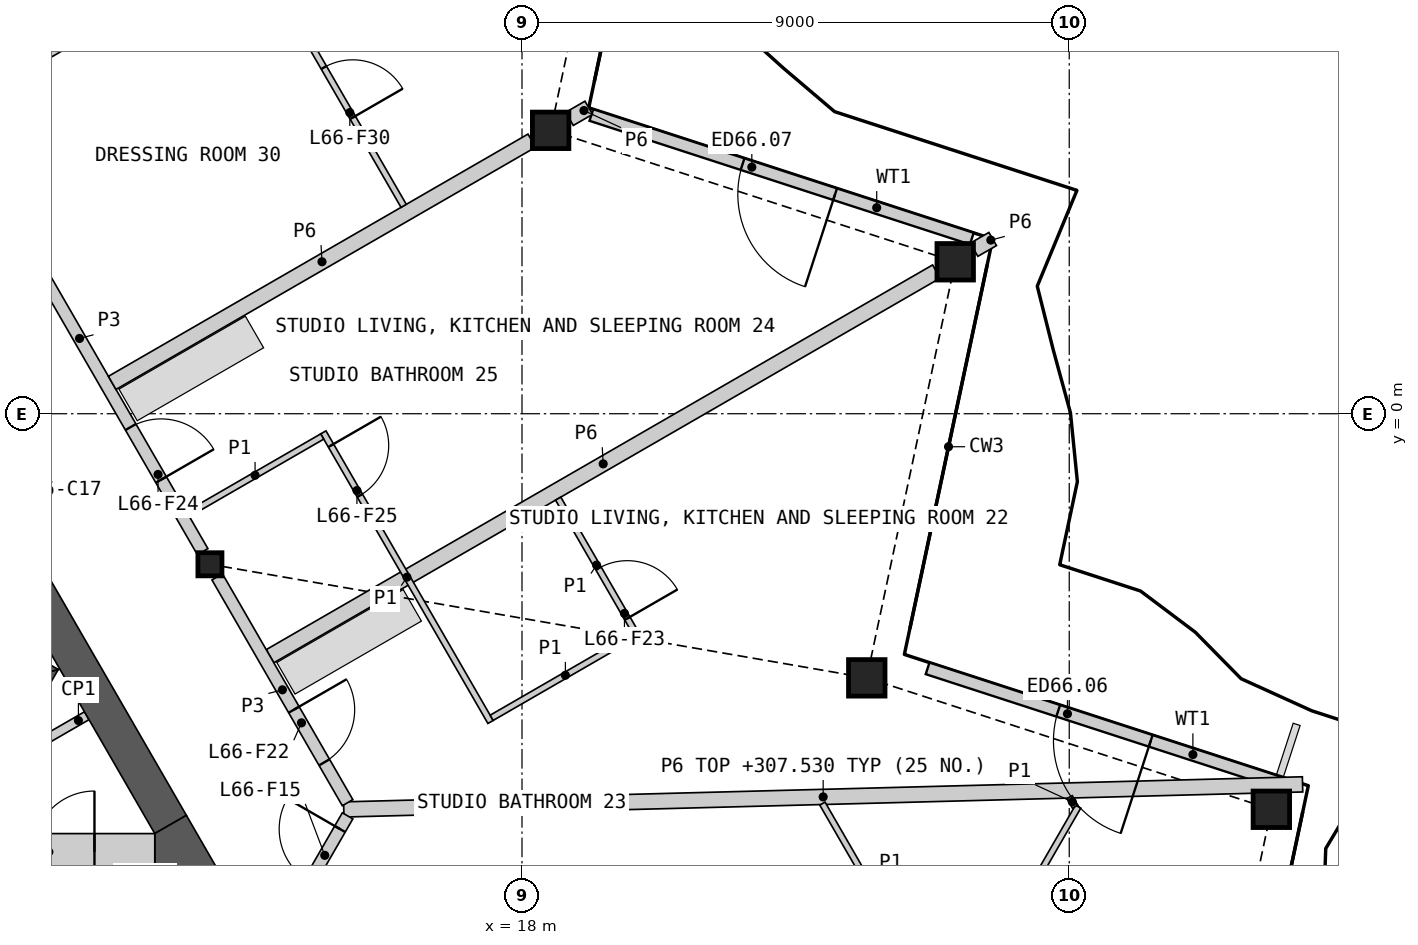
"""IFC4 building model, lengths in metres.
Left out: names, types, materials, properties, quantities, classifications, styles, units other than length and angle.
Written with IfcOpenShell. Run it as: python <this file> out.ifc"""

import sys

from ifc_helpers import new_model, si_unit, direction, frame, frame_2d, origin, origin_2d, place, context, subcontext, project, spatial, polyline, rectangle, hollow_rectangle, i_section, outline, extrude, element, fill, save


model = new_model("IFC4")
c1 = context("Model", 3, precision=1e-05, world=origin(), true_north=direction((0.0, 1.0)))
c2 = subcontext(c1, "Body", "Model", "MODEL_VIEW")
j1 = project(units=[si_unit("LENGTHUNIT", "METRE"), si_unit("PLANEANGLEUNIT", "RADIAN")], contexts=[c1])
p1 = place(None, origin())
s1 = spatial("IfcSite", under=j1, at=p1, CompositionType="ELEMENT")
p2 = place(p1, origin())
s2 = spatial("IfcBuilding", under=s1, at=p2, CompositionType="ELEMENT")
p3 = place(p2, frame((0.0, 0.0, 305.2)))
s3 = spatial("IfcBuildingStorey", under=s2, at=p3, CompositionType="ELEMENT", Elevation=305.2)
for number, where, z_axis, x_axis in (
    (1, (30.324, -6.506, 0.0), (0.0, 0.0, 1.0), (1.0, 0.0, 0.0)),
    (2, (23.67, -4.344, 0.0), (0.0, 0.0, 1.0), (1.0, 0.0, 0.0)),
    (3, (25.125, 2.499, 0.0), (0.0, 0.0, 1.0), (1.0, 0.0, 0.0)),
    (4, (18.471, 4.661, 0.0), (0.0, 0.0, 1.0), (1.0, 0.0, 0.0)),
):
    element("IfcColumn", number, at=place(p3, frame(where, z_axis=z_axis, x_axis=x_axis)), inside=s3, PredefinedType="COLUMN", context=c2, shape_type="SweptSolid", body=[
        extrude(hollow_rectangle(XDim=0.6, YDim=0.6, WallThickness=0.04, at=origin_2d()), origin(), (0.0, 0.0, 1.0), 3.4),
    ])
p4 = place(p3, frame((12.868, -2.476, 0.0), z_axis=(0.0, 0.0, 1.0), x_axis=(1.0, 0.0, 0.0)))
e5 = element("IfcColumn", 5, at=p4, inside=s3, PredefinedType="COLUMN", context=c2, shape_type="SweptSolid", body=[
    extrude(i_section(OverallWidth=0.396, OverallDepth=0.381, WebThickness=0.019, FlangeThickness=0.03, at=origin_2d()), origin(), (0.0, 0.0, 1.0), 3.4),
])
p5 = place(p3, frame((30.488, -6.078, 0.0), z_axis=(0.0, 0.0, 1.0), x_axis=(-0.951062515241, 0.308998530908, 0.0)))
e6 = element("IfcWall", 6, at=p5, inside=s3, PredefinedType="SOLIDWALL", context=c2, shape_type="SweptSolid", body=[
    extrude(rectangle(XDim=6.117, YDim=0.2, at=frame_2d((3.059, 0.0))), origin(), (0.0, 0.0, 1.0), 2.488),
])
p6 = place(p5, frame((2.259, 0.0, 0.0)))
e7 = element("IfcOpeningElement", 7, at=p6, cuts=e6, PredefinedType="OPENING", context=c2, shape_type="SweptSolid", body=[
    extrude(rectangle(XDim=1.6, YDim=2.25, at=frame_2d((0.8, 1.125))), frame((0.0, 0.11, 0.0), z_axis=(0.0, -1.0, 0.0), x_axis=(1.0, 0.0, 0.0)), (0.0, 0.0, 1.0), 0.22),
])
p7 = place(p3, frame((25.398, 2.88, 0.0), z_axis=(0.0, 0.0, 1.0), x_axis=(-0.95105697409, 0.309015585424, 0.0)))
e8 = element("IfcWall", 8, at=p7, inside=s3, PredefinedType="SOLIDWALL", context=c2, shape_type="SweptSolid", body=[
    extrude(rectangle(XDim=6.579, YDim=0.2, at=frame_2d((3.29, 0.0))), origin(), (0.0, 0.0, 1.0), 2.488),
])
p8 = place(p7, frame((2.364, 0.0, 0.0)))
e9 = element("IfcOpeningElement", 9, at=p8, cuts=e8, PredefinedType="OPENING", context=c2, shape_type="SweptSolid", body=[
    extrude(rectangle(XDim=1.6, YDim=2.25, at=frame_2d((0.8, 1.125))), frame((0.0, 0.11, 0.0), z_axis=(0.0, -1.0, 0.0), x_axis=(1.0, 0.0, 0.0)), (0.0, 0.0, 1.0), 0.22),
])
p9 = place(p3, origin())
e10 = element("IfcWall", 10, at=p9, inside=s3, PredefinedType="SHEAR", context=c2, shape_type="SweptSolid", body=[
    extrude(outline(polyline([(8.83, -6.881), (10.374, -4.206), (10.032, -4.298), (8.738, -6.539), (8.83, -6.881)])), origin(), (0.0, 0.0, 1.0), 3.1),
])
p10 = place(p3, origin())
e11 = element("IfcWall", 11, at=p10, inside=s3, PredefinedType="SHEAR", context=c2, shape_type="SweptSolid", body=[
    extrude(outline(polyline([(10.032, -4.298), (10.374, -4.206), (5.307, -1.281), (5.182, -1.498), (10.032, -4.298)])), origin(), (0.0, 0.0, 1.0), 3.1),
])
p11 = place(p3, frame((10.842, -4.967, 0.0), z_axis=(0.0, 0.0, 1.0), x_axis=(-0.866098216386, -0.499873863663, 0.0)))
e12 = element("IfcWall", 12, at=p11, inside=s3, PredefinedType="PARTITIONING", context=c2, shape_type="SweptSolid", body=[
    extrude(rectangle(XDim=1.582, YDim=0.15, at=frame_2d((0.791, 0.0))), origin(), (0.0, 0.0, 1.0), 3.1),
])
p12 = place(p3, frame((12.221, -6.756, 0.0), z_axis=(0.0, 0.0, 1.0), x_axis=(-0.500020646047, 0.866013483456, 0.0)))
e13 = element("IfcWall", 13, at=p12, inside=s3, PredefinedType="SHEAR", context=c2, shape_type="SweptSolid", body=[
    extrude(rectangle(XDim=4.559, YDim=0.6, at=frame_2d((2.28, 0.0))), origin(), (0.0, 0.0, 1.0), 3.1),
])
p13 = place(p3, origin())
e14 = element("IfcWall", 14, at=p13, inside=s3, PredefinedType="SHEAR", context=c2, shape_type="SweptSolid", body=[
    extrude(outline(polyline([(11.961, -7.506), (11.961, -6.906), (12.48, -6.606), (13.0, -7.506), (11.961, -7.506)])), origin(), (0.0, 0.0, 1.0), 3.1),
])
p14 = place(p3, frame((9.369, -7.206, 0.0), z_axis=(0.0, 0.0, 1.0), x_axis=(1.0, 0.0, 0.0)))
e15 = element("IfcWall", 15, at=p14, inside=s3, PredefinedType="SHEAR", context=c2, shape_type="SweptSolid", body=[
    extrude(rectangle(XDim=2.592, YDim=0.6, at=frame_2d((1.296, 0.0))), origin(), (0.0, 0.0, 1.0), 3.1),
])
p15 = place(p14, frame((0.6, 0.0, 0.0)))
e16 = element("IfcOpeningElement", 16, at=p15, cuts=e15, PredefinedType="OPENING", context=c2, shape_type="SweptSolid", body=[
    extrude(rectangle(XDim=1.0, YDim=2.1, at=frame_2d((0.5, 1.05))), frame((0.0, 0.31, 0.0), z_axis=(0.0, -1.0, 0.0), x_axis=(1.0, 0.0, 0.0)), (0.0, 0.0, 1.0), 0.62),
])
p16 = place(p3, frame((15.069, -6.509, 0.0), z_axis=(0.0, 0.0, 1.0), x_axis=(0.999657828615, 0.026157708023, 0.0)))
e17 = element("IfcWall", 17, at=p16, inside=s3, PredefinedType="PARTITIONING", context=c2, shape_type="SweptSolid", body=[
    extrude(rectangle(XDim=15.773, YDim=0.25, at=frame_2d((7.887, 0.0))), origin(), (0.0, 0.0, 1.0), 2.33),
])
p17 = place(p3, frame((13.856, -3.988, 0.0), z_axis=(0.0, 0.0, 1.0), x_axis=(0.866021406514, 0.500006923412, 0.0)))
e18 = element("IfcWall", 18, at=p17, inside=s3, PredefinedType="PARTITIONING", context=c2, shape_type="SweptSolid", body=[
    extrude(rectangle(XDim=12.654, YDim=0.25, at=frame_2d((6.327, 0.0))), origin(), (0.0, 0.0, 1.0), 2.33),
])
p18 = place(p3, frame((8.698, 4.745, 0.0), z_axis=(0.0, 0.0, 1.0), x_axis=(0.499984266882, -0.866034487114, 0.0)))
e19 = element("IfcWall", 19, at=p18, inside=s3, PredefinedType="PARTITIONING", context=c2, shape_type="SweptSolid", body=[
    extrude(rectangle(XDim=8.099, YDim=0.2, at=frame_2d((4.049, 0.0))), origin(), (0.0, 0.0, 1.0), 3.1),
])
p19 = place(p18, frame((5.732, 0.0, 0.0)))
e20 = element("IfcOpeningElement", 20, at=p19, cuts=e19, PredefinedType="OPENING", context=c2, shape_type="SweptSolid", body=[
    extrude(rectangle(XDim=1.0, YDim=2.1, at=frame_2d((0.5, 1.05))), frame((0.0, 0.11, 0.0), z_axis=(0.0, -1.0, 0.0), x_axis=(1.0, 0.0, 0.0)), (0.0, 0.0, 1.0), 0.22),
])
p20 = place(p3, frame((11.26, 0.507, 0.0), z_axis=(0.0, 0.0, 1.0), x_axis=(0.86602842894, 0.499994760241, 0.0)))
e21 = element("IfcWall", 21, at=p20, inside=s3, PredefinedType="PARTITIONING", context=c2, shape_type="SweptSolid", body=[
    extrude(rectangle(XDim=7.968, YDim=0.25, at=frame_2d((3.984, 0.0))), origin(), (0.0, 0.0, 1.0), 2.33),
])
p21 = place(p3, frame((12.988, -2.684, 0.0), z_axis=(0.0, 0.0, 1.0), x_axis=(0.500003406062, -0.866023437285, 0.0)))
e22 = element("IfcWall", 22, at=p21, inside=s3, PredefinedType="PARTITIONING", context=c2, shape_type="SweptSolid", body=[
    extrude(rectangle(XDim=4.288, YDim=0.2, at=frame_2d((2.144, 0.0))), origin(), (0.0, 0.0, 1.0), 3.1),
])
p22 = place(p21, frame((2.521, 0.0, 0.0)))
e23 = element("IfcOpeningElement", 23, at=p22, cuts=e22, PredefinedType="OPENING", context=c2, shape_type="SweptSolid", body=[
    extrude(rectangle(XDim=1.0, YDim=2.1, at=frame_2d((0.5, 1.05))), frame((0.0, 0.11, 0.0), z_axis=(0.0, -1.0, 0.0), x_axis=(1.0, 0.0, 0.0)), (0.0, 0.0, 1.0), 0.22),
])
p23 = place(p3, frame((13.293, -9.797, 0.0), z_axis=(0.0, 0.0, 1.0), x_axis=(0.499967746641, 0.866044024469, 0.0)))
e24 = element("IfcWall", 24, at=p23, inside=s3, PredefinedType="PARTITIONING", context=c2, shape_type="SweptSolid", body=[
    extrude(rectangle(XDim=3.676, YDim=0.2, at=frame_2d((1.838, 0.0))), origin(), (0.0, 0.0, 1.0), 3.1),
])
p24 = place(p23, frame((2.426, 0.0, 0.0)))
e25 = element("IfcOpeningElement", 25, at=p24, cuts=e24, PredefinedType="OPENING", context=c2, shape_type="SweptSolid", body=[
    extrude(rectangle(XDim=1.0, YDim=2.1, at=frame_2d((0.5, 1.05))), frame((0.0, 0.11, 0.0), z_axis=(0.0, -1.0, 0.0), x_axis=(1.0, 0.0, 0.0)), (0.0, 0.0, 1.0), 0.22),
])
p25 = place(p3, frame((18.781, 4.849, 0.0), z_axis=(0.0, 0.0, 1.0), x_axis=(0.86609656662, 0.499876722092, 0.0)))
e26 = element("IfcWall", 26, at=p25, inside=s3, PredefinedType="PARTITIONING", context=c2, shape_type="SweptSolid", body=[
    extrude(rectangle(XDim=0.365, YDim=0.25, at=frame_2d((0.183, 0.0))), origin(), (0.0, 0.0, 1.0), 2.33),
])
p26 = place(p3, frame((25.435, 2.697, 0.0), z_axis=(0.0, 0.0, 1.0), x_axis=(0.865851769275, 0.500300623268, 0.0)))
e27 = element("IfcWall", 27, at=p26, inside=s3, PredefinedType="PARTITIONING", context=c2, shape_type="SweptSolid", body=[
    extrude(rectangle(XDim=0.353, YDim=0.25, at=frame_2d((0.177, 0.0))), origin(), (0.0, 0.0, 1.0), 2.33),
])
p27 = place(p3, frame((8.786, 5.073, 0.0), z_axis=(0.0, 0.0, 1.0), x_axis=(0.86602139559, 0.500006942333, 0.0)))
e28 = element("IfcWall", 28, at=p27, inside=s3, PredefinedType="PARTITIONING", context=c2, shape_type="SweptSolid", body=[
    extrude(rectangle(XDim=12.505, YDim=0.1, at=frame_2d((6.252, 0.0))), origin(), (0.0, 0.0, 1.0), 2.33),
])
p28 = place(p27, frame((5.677, 0.0, 0.0)))
e29 = element("IfcOpeningElement", 29, at=p28, cuts=e28, PredefinedType="OPENING", context=c2, shape_type="SweptSolid", body=[
    extrude(rectangle(XDim=0.95, YDim=2.1, at=frame_2d((0.475, 1.05))), frame((0.0, 0.06, 0.0), z_axis=(0.0, -1.0, 0.0), x_axis=(1.0, 0.0, 0.0)), (0.0, 0.0, 1.0), 0.12),
])
p29 = place(p3, frame((23.183, -13.327, 0.0), z_axis=(0.0, 0.0, 1.0), x_axis=(0.499991741039, 0.866030172045, 0.0)))
e30 = element("IfcWall", 30, at=p29, inside=s3, PredefinedType="PARTITIONING", context=c2, shape_type="SweptSolid", body=[
    extrude(rectangle(XDim=7.927, YDim=0.1, at=frame_2d((3.963, 0.0))), origin(), (0.0, 0.0, 1.0), 2.33),
])
p30 = place(p29, frame((1.97, 0.0, 0.0)))
e31 = element("IfcOpeningElement", 31, at=p30, cuts=e30, PredefinedType="OPENING", context=c2, shape_type="SweptSolid", body=[
    extrude(rectangle(XDim=0.95, YDim=2.1, at=frame_2d((0.475, 1.05))), frame((0.0, 0.06, 0.0), z_axis=(0.0, -1.0, 0.0), x_axis=(1.0, 0.0, 0.0)), (0.0, 0.0, 1.0), 0.12),
])
p31 = place(p3, frame((14.733, -0.307, 0.0), z_axis=(0.0, 0.0, 1.0), x_axis=(0.499996545922, -0.866027397988, 0.0)))
e32 = element("IfcWall", 32, at=p31, inside=s3, PredefinedType="PARTITIONING", context=c2, shape_type="SweptSolid", body=[
    extrude(rectangle(XDim=5.5, YDim=0.1, at=frame_2d((2.75, 0.0))), origin(), (0.0, 0.0, 1.0), 2.33),
])
p32 = place(p31, frame((0.25, 0.0, 0.0)))
e33 = element("IfcOpeningElement", 33, at=p32, cuts=e32, PredefinedType="OPENING", context=c2, shape_type="SweptSolid", body=[
    extrude(rectangle(XDim=0.95, YDim=2.1, at=frame_2d((0.475, 1.05))), frame((0.0, 0.06, 0.0), z_axis=(0.0, -1.0, 0.0), x_axis=(1.0, 0.0, 0.0)), (0.0, 0.0, 1.0), 0.12),
])
p33 = place(p3, frame((13.546, 7.763, 0.0), z_axis=(0.0, 0.0, 1.0), x_axis=(0.500028620461, -0.866008879123, 0.0)))
e34 = element("IfcWall", 34, at=p33, inside=s3, PredefinedType="PARTITIONING", context=c2, shape_type="SweptSolid", body=[
    extrude(rectangle(XDim=5.016, YDim=0.1, at=frame_2d((2.508, 0.0))), origin(), (0.0, 0.0, 1.0), 2.33),
])
p34 = place(p33, frame((2.39, 0.0, 0.0)))
e35 = element("IfcOpeningElement", 35, at=p34, cuts=e34, PredefinedType="OPENING", context=c2, shape_type="SweptSolid", body=[
    extrude(rectangle(XDim=0.95, YDim=2.1, at=frame_2d((0.475, 1.05))), frame((0.0, 0.06, 0.0), z_axis=(0.0, -1.0, 0.0), x_axis=(1.0, 0.0, 0.0)), (0.0, 0.0, 1.0), 0.12),
])
p35 = place(p3, frame((22.941, -6.413, 0.0), z_axis=(0.0, 0.0, 1.0), x_axis=(0.500013199183, -0.866017783098, 0.0)))
e36 = element("IfcWall", 36, at=p35, inside=s3, PredefinedType="PARTITIONING", context=c2, shape_type="SweptSolid", body=[
    extrude(rectangle(XDim=3.077, YDim=0.1, at=frame_2d((1.539, 0.0))), origin(), (0.0, 0.0, 1.0), 2.33),
])
p36 = place(p3, frame((17.501, -5.001, 0.0), z_axis=(0.0, 0.0, 1.0), x_axis=(0.866034573852, 0.49998411664, 0.0)))
e37 = element("IfcWall", 37, at=p36, inside=s3, PredefinedType="PARTITIONING", context=c2, shape_type="SweptSolid", body=[
    extrude(rectangle(XDim=2.8, YDim=0.1, at=frame_2d((1.4, 0.0))), origin(), (0.0, 0.0, 1.0), 2.33),
])
p37 = place(p3, frame((18.595, -1.396, 0.0), z_axis=(0.0, 0.0, 1.0), x_axis=(0.499976333282, -0.866039067339, 0.0)))
e38 = element("IfcWall", 38, at=p37, inside=s3, PredefinedType="PARTITIONING", context=c2, shape_type="SweptSolid", body=[
    extrude(rectangle(XDim=2.525, YDim=0.1, at=frame_2d((1.262, 0.0))), origin(), (0.0, 0.0, 1.0), 2.33),
])
p38 = place(p37, frame((1.325, 0.0, 0.0)))
e39 = element("IfcOpeningElement", 39, at=p38, cuts=e38, PredefinedType="OPENING", context=c2, shape_type="SweptSolid", body=[
    extrude(rectangle(XDim=0.95, YDim=2.1, at=frame_2d((0.475, 1.05))), frame((0.0, 0.06, 0.0), z_axis=(0.0, -1.0, 0.0), x_axis=(1.0, 0.0, 0.0)), (0.0, 0.0, 1.0), 0.12),
])
p39 = place(p3, frame((12.506, -1.65, 0.0), z_axis=(0.0, 0.0, 1.0), x_axis=(0.866030925526, 0.499990435942, 0.0)))
e40 = element("IfcWall", 40, at=p39, inside=s3, PredefinedType="PARTITIONING", context=c2, shape_type="SweptSolid", body=[
    extrude(rectangle(XDim=2.55, YDim=0.1, at=frame_2d((1.275, 0.0))), origin(), (0.0, 0.0, 1.0), 2.33),
])
p40 = place(p3, frame((27.006, -6.306, 0.0), z_axis=(0.0, 0.0, 1.0), x_axis=(0.500074377092, -0.865982457891, 0.0)))
e41 = element("IfcWall", 41, at=p40, inside=s3, PredefinedType="PARTITIONING", context=c2, shape_type="SweptSolid", body=[
    extrude(rectangle(XDim=0.18, YDim=0.1, at=frame_2d((0.09, 0.0))), origin(), (0.0, 0.0, 1.0), 2.33),
])
p41 = place(p6, origin())
e42 = element("IfcDoor", 42, at=p41, inside=s3, OperationType="DOUBLE_DOOR_SINGLE_SWING", PredefinedType="DOOR", context=c2, shape_type="SweptSolid", body=[
    extrude(rectangle(XDim=1.6, YDim=2.25, at=frame_2d((0.8, 1.125))), frame((0.0, 0.025, 0.0), z_axis=(0.0, -1.0, 0.0), x_axis=(1.0, 0.0, 0.0)), (0.0, 0.0, 1.0), 0.05),
])
fill(e7, e42)
p42 = place(p8, origin())
e43 = element("IfcDoor", 43, at=p42, inside=s3, OperationType="DOUBLE_DOOR_SINGLE_SWING", PredefinedType="DOOR", context=c2, shape_type="SweptSolid", body=[
    extrude(rectangle(XDim=1.6, YDim=2.25, at=frame_2d((0.8, 1.125))), frame((0.0, 0.025, 0.0), z_axis=(0.0, -1.0, 0.0), x_axis=(1.0, 0.0, 0.0)), (0.0, 0.0, 1.0), 0.05),
])
fill(e9, e43)
p43 = place(p15, origin())
e44 = element("IfcDoor", 44, at=p43, inside=s3, OperationType="SINGLE_SWING_RIGHT", PredefinedType="DOOR", context=c2, shape_type="SweptSolid", body=[
    extrude(rectangle(XDim=1.0, YDim=2.1, at=frame_2d((0.5, 1.05))), frame((0.0, 0.055, 0.0), z_axis=(0.0, -1.0, 0.0), x_axis=(1.0, 0.0, 0.0)), (0.0, 0.0, 1.0), 0.05),
])
fill(e16, e44)
p44 = place(p24, origin())
e45 = element("IfcDoor", 45, at=p44, inside=s3, OperationType="SINGLE_SWING_RIGHT", PredefinedType="DOOR", context=c2, shape_type="SweptSolid", body=[
    extrude(rectangle(XDim=1.0, YDim=2.1, at=frame_2d((0.5, 1.05))), frame((0.0, 0.025, 0.0), z_axis=(0.0, -1.0, 0.0), x_axis=(1.0, 0.0, 0.0)), (0.0, 0.0, 1.0), 0.05),
])
fill(e25, e45)
p45 = place(p22, origin())
e46 = element("IfcDoor", 46, at=p45, inside=s3, OperationType="SINGLE_SWING_LEFT", PredefinedType="DOOR", context=c2, shape_type="SweptSolid", body=[
    extrude(rectangle(XDim=1.0, YDim=2.1, at=frame_2d((0.5, 1.05))), frame((0.0, 0.025, 0.0), z_axis=(0.0, -1.0, 0.0), x_axis=(1.0, 0.0, 0.0)), (0.0, 0.0, 1.0), 0.05),
])
fill(e23, e46)
p46 = place(p38, origin())
e47 = element("IfcDoor", 47, at=p46, inside=s3, OperationType="SINGLE_SWING_RIGHT", PredefinedType="DOOR", context=c2, shape_type="SweptSolid", body=[
    extrude(rectangle(XDim=0.95, YDim=2.1, at=frame_2d((0.475, 1.05))), frame((0.0, 0.025, 0.0), z_axis=(0.0, -1.0, 0.0), x_axis=(1.0, 0.0, 0.0)), (0.0, 0.0, 1.0), 0.05),
])
fill(e39, e47)
p47 = place(p19, origin())
e48 = element("IfcDoor", 48, at=p47, inside=s3, OperationType="SINGLE_SWING_RIGHT", PredefinedType="DOOR", context=c2, shape_type="SweptSolid", body=[
    extrude(rectangle(XDim=1.0, YDim=2.1, at=frame_2d((0.5, 1.05))), frame((0.0, 0.025, 0.0), z_axis=(0.0, -1.0, 0.0), x_axis=(1.0, 0.0, 0.0)), (0.0, 0.0, 1.0), 0.05),
])
fill(e20, e48)
p48 = place(p32, origin())
e49 = element("IfcDoor", 49, at=p48, inside=s3, OperationType="SINGLE_SWING_LEFT", PredefinedType="DOOR", context=c2, shape_type="SweptSolid", body=[
    extrude(rectangle(XDim=0.95, YDim=2.1, at=frame_2d((0.475, 1.05))), frame((0.0, 0.025, 0.0), z_axis=(0.0, -1.0, 0.0), x_axis=(1.0, 0.0, 0.0)), (0.0, 0.0, 1.0), 0.05),
])
fill(e33, e49)
p49 = place(p34, origin())
e50 = element("IfcDoor", 50, at=p49, inside=s3, OperationType="SINGLE_SWING_RIGHT", PredefinedType="DOOR", context=c2, shape_type="SweptSolid", body=[
    extrude(rectangle(XDim=0.95, YDim=2.1, at=frame_2d((0.475, 1.05))), frame((0.0, 0.025, 0.0), z_axis=(0.0, -1.0, 0.0), x_axis=(1.0, 0.0, 0.0)), (0.0, 0.0, 1.0), 0.05),
])
fill(e35, e50)
save(model, sys.argv[1])
